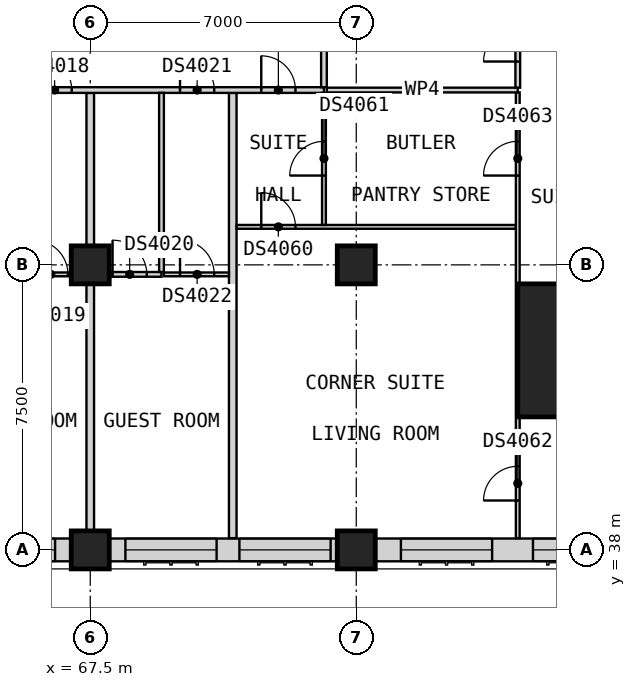
"""IFC4 building model, lengths in metres.
Left out: names, types, materials, properties, quantities, classifications, styles, units other than length and angle.
Written with IfcOpenShell. Run it as: python <this file> out.ifc"""

import sys

from ifc_helpers import new_model, si_unit, direction, frame, frame_2d, origin, origin_2d, place, context, subcontext, project, spatial, rectangle, extrude, element, fill, save


model = new_model("IFC4")
c1 = context("Model", 3, precision=1e-05, world=origin(), true_north=direction((0.0, 1.0)))
c2 = subcontext(c1, "Body", "Model", "MODEL_VIEW")
j1 = project(units=[si_unit("LENGTHUNIT", "METRE"), si_unit("PLANEANGLEUNIT", "RADIAN")], contexts=[c1])
p1 = place(None, origin())
s1 = spatial("IfcSite", under=j1, at=p1, CompositionType="ELEMENT")
p2 = place(p1, origin())
s2 = spatial("IfcBuilding", under=s1, at=p2, CompositionType="ELEMENT")
p3 = place(p2, frame((0.0, 0.0, 141.0)))
s3 = spatial("IfcBuildingStorey", under=s2, at=p3, CompositionType="ELEMENT", Elevation=141.0)
for number, where, z_axis, x_axis in (
    (1, (67.5, 38.0, 0.0), (0.0, 0.0, 1.0), (1.0, 0.0, 0.0)),
    (2, (67.5, 45.5, 0.0), (0.0, 0.0, 1.0), (1.0, 0.0, 0.0)),
    (3, (74.5, 38.0, 0.0), (0.0, 0.0, 1.0), (1.0, 0.0, 0.0)),
    (4, (74.5, 45.5, 0.0), (0.0, 0.0, 1.0), (1.0, 0.0, 0.0)),
):
    element("IfcColumn", number, at=place(p3, frame(where, z_axis=z_axis, x_axis=x_axis)), inside=s3, PredefinedType="COLUMN", context=c2, shape_type="SweptSolid", body=[
        extrude(rectangle(XDim=1.0, YDim=1.0, at=origin_2d()), origin(), (0.0, 0.0, 1.0), 3.6),
    ])
p4 = place(p3, frame((80.5, 43.25, 0.0), z_axis=(0.0, 0.0, 1.0), x_axis=(1.0, 0.0, 0.0)))
e5 = element("IfcColumn", 5, at=p4, inside=s3, PredefinedType="COLUMN", context=c2, shape_type="SweptSolid", body=[
    extrude(rectangle(XDim=3.5, YDim=3.5, at=origin_2d()), origin(), (0.0, 0.0, 1.0), 3.6),
])
p5 = place(p3, frame((60.5, 38.0, 0.0), z_axis=(0.0, 0.0, 1.0), x_axis=(1.0, 0.0, 0.0)))
e6 = element("IfcWall", 6, at=p5, inside=s3, PredefinedType="SOLIDWALL", context=c2, shape_type="SweptSolid", body=[
    extrude(rectangle(XDim=6.5, YDim=0.6, at=frame_2d((3.25, 0.0))), origin(), (0.0, 0.0, 1.0), 2.85),
])
p6 = place(p5, frame((0.425, 0.0, 0.8)))
e7 = element("IfcOpeningElement", 7, at=p6, cuts=e6, PredefinedType="OPENING", context=c2, shape_type="SweptSolid", body=[
    extrude(rectangle(XDim=2.4, YDim=1.8, at=frame_2d((1.2, 0.9))), frame((0.0, 0.31, 0.0), z_axis=(0.0, -1.0, 0.0), x_axis=(1.0, 0.0, 0.0)), (0.0, 0.0, 1.0), 0.62),
])
p7 = place(p5, frame((3.675, 0.0, 0.8)))
e8 = element("IfcOpeningElement", 8, at=p7, cuts=e6, PredefinedType="OPENING", context=c2, shape_type="SweptSolid", body=[
    extrude(rectangle(XDim=2.4, YDim=1.8, at=frame_2d((1.2, 0.9))), frame((0.0, 0.31, 0.0), z_axis=(0.0, -1.0, 0.0), x_axis=(1.0, 0.0, 0.0)), (0.0, 0.0, 1.0), 0.62),
])
p8 = place(p3, frame((68.0, 38.0, 0.0), z_axis=(0.0, 0.0, 1.0), x_axis=(1.0, 0.0, 0.0)))
e9 = element("IfcWall", 9, at=p8, inside=s3, PredefinedType="SOLIDWALL", context=c2, shape_type="SweptSolid", body=[
    extrude(rectangle(XDim=6.0, YDim=0.6, at=frame_2d((3.0, 0.0))), origin(), (0.0, 0.0, 1.0), 2.85),
])
p9 = place(p8, frame((0.425, 0.0, 0.8)))
e10 = element("IfcOpeningElement", 10, at=p9, cuts=e9, PredefinedType="OPENING", context=c2, shape_type="SweptSolid", body=[
    extrude(rectangle(XDim=2.4, YDim=1.8, at=frame_2d((1.2, 0.9))), frame((0.0, 0.31, 0.0), z_axis=(0.0, -1.0, 0.0), x_axis=(1.0, 0.0, 0.0)), (0.0, 0.0, 1.0), 0.62),
])
p10 = place(p8, frame((3.425, 0.0, 0.8)))
e11 = element("IfcOpeningElement", 11, at=p10, cuts=e9, PredefinedType="OPENING", context=c2, shape_type="SweptSolid", body=[
    extrude(rectangle(XDim=2.4, YDim=1.8, at=frame_2d((1.2, 0.9))), frame((0.0, 0.31, 0.0), z_axis=(0.0, -1.0, 0.0), x_axis=(1.0, 0.0, 0.0)), (0.0, 0.0, 1.0), 0.62),
])
p11 = place(p3, frame((75.0, 38.0, 0.0), z_axis=(0.0, 0.0, 1.0), x_axis=(1.0, 0.0, 0.0)))
e12 = element("IfcWall", 12, at=p11, inside=s3, PredefinedType="SOLIDWALL", context=c2, shape_type="SweptSolid", body=[
    extrude(rectangle(XDim=7.25, YDim=0.6, at=frame_2d((3.625, 0.0))), origin(), (0.0, 0.0, 1.0), 2.85),
])
p12 = place(p11, frame((0.675, 0.0, 0.8)))
e13 = element("IfcOpeningElement", 13, at=p12, cuts=e12, PredefinedType="OPENING", context=c2, shape_type="SweptSolid", body=[
    extrude(rectangle(XDim=2.4, YDim=1.8, at=frame_2d((1.2, 0.9))), frame((0.0, 0.31, 0.0), z_axis=(0.0, -1.0, 0.0), x_axis=(1.0, 0.0, 0.0)), (0.0, 0.0, 1.0), 0.62),
])
p13 = place(p11, frame((4.15, 0.0, 0.8)))
e14 = element("IfcOpeningElement", 14, at=p13, cuts=e12, PredefinedType="OPENING", context=c2, shape_type="SweptSolid", body=[
    extrude(rectangle(XDim=1.8, YDim=1.8, at=frame_2d((0.9, 0.9))), frame((0.0, 0.31, 0.0), z_axis=(0.0, -1.0, 0.0), x_axis=(1.0, 0.0, 0.0)), (0.0, 0.0, 1.0), 0.62),
])
p14 = place(p3, frame((67.5, 37.5, 0.0), z_axis=(0.0, 0.0, 1.0), x_axis=(0.0, 1.0, 0.0)))
e15 = element("IfcWall", 15, at=p14, inside=s3, PredefinedType="PARTITIONING", context=c2, shape_type="SweptSolid", body=[
    extrude(rectangle(XDim=12.525, YDim=0.2, at=frame_2d((6.262, 0.0))), origin(), (0.0, 0.0, 1.0), 3.35),
])
p15 = place(p3, frame((71.25, 38.31, 0.0), z_axis=(0.0, 0.0, 1.0), x_axis=(0.0, 1.0, 0.0)))
e16 = element("IfcWall", 16, at=p15, inside=s3, PredefinedType="PARTITIONING", context=c2, shape_type="SweptSolid", body=[
    extrude(rectangle(XDim=11.715, YDim=0.2, at=frame_2d((5.857, 0.0))), origin(), (0.0, 0.0, 1.0), 3.35),
])
p16 = place(p3, frame((33.75, 50.1, 0.0), z_axis=(0.0, 0.0, 1.0), x_axis=(1.0, 0.0, 0.0)))
e17 = element("IfcWall", 17, at=p16, inside=s3, PredefinedType="PARTITIONING", context=c2, shape_type="SweptSolid", body=[
    extrude(rectangle(XDim=39.9, YDim=0.15, at=frame_2d((19.95, 0.0))), origin(), (0.0, 0.0, 1.0), 3.35),
])
p17 = place(p16, frame((5.175, 0.0, 0.0)))
e18 = element("IfcOpeningElement", 18, at=p17, cuts=e17, PredefinedType="OPENING", context=c2, shape_type="SweptSolid", body=[
    extrude(rectangle(XDim=0.9, YDim=2.1, at=frame_2d((0.45, 1.05))), frame((0.0, 0.085, 0.0), z_axis=(0.0, -1.0, 0.0), x_axis=(1.0, 0.0, 0.0)), (0.0, 0.0, 1.0), 0.17),
])
p18 = place(p16, frame((9.863, 0.0, 0.0)))
e19 = element("IfcOpeningElement", 19, at=p18, cuts=e17, PredefinedType="OPENING", context=c2, shape_type="SweptSolid", body=[
    extrude(rectangle(XDim=0.9, YDim=2.1, at=frame_2d((0.45, 1.05))), frame((0.0, 0.085, 0.0), z_axis=(0.0, -1.0, 0.0), x_axis=(1.0, 0.0, 0.0)), (0.0, 0.0, 1.0), 0.17),
])
p19 = place(p16, frame((13.613, 0.0, 0.0)))
e20 = element("IfcOpeningElement", 20, at=p19, cuts=e17, PredefinedType="OPENING", context=c2, shape_type="SweptSolid", body=[
    extrude(rectangle(XDim=0.9, YDim=2.1, at=frame_2d((0.45, 1.05))), frame((0.0, 0.085, 0.0), z_axis=(0.0, -1.0, 0.0), x_axis=(1.0, 0.0, 0.0)), (0.0, 0.0, 1.0), 0.17),
])
p20 = place(p16, frame((20.688, 0.0, 0.0)))
e21 = element("IfcOpeningElement", 21, at=p20, cuts=e17, PredefinedType="OPENING", context=c2, shape_type="SweptSolid", body=[
    extrude(rectangle(XDim=1.0, YDim=2.1, at=frame_2d((0.5, 1.05))), frame((0.0, 0.085, 0.0), z_axis=(0.0, -1.0, 0.0), x_axis=(1.0, 0.0, 0.0)), (0.0, 0.0, 1.0), 0.17),
])
p21 = place(p16, frame((28.188, 0.0, 0.0)))
e22 = element("IfcOpeningElement", 22, at=p21, cuts=e17, PredefinedType="OPENING", context=c2, shape_type="SweptSolid", body=[
    extrude(rectangle(XDim=1.0, YDim=2.1, at=frame_2d((0.5, 1.05))), frame((0.0, 0.085, 0.0), z_axis=(0.0, -1.0, 0.0), x_axis=(1.0, 0.0, 0.0)), (0.0, 0.0, 1.0), 0.17),
])
p22 = place(p16, frame((32.363, 0.0, 0.0)))
e23 = element("IfcOpeningElement", 23, at=p22, cuts=e17, PredefinedType="OPENING", context=c2, shape_type="SweptSolid", body=[
    extrude(rectangle(XDim=0.9, YDim=2.1, at=frame_2d((0.45, 1.05))), frame((0.0, 0.085, 0.0), z_axis=(0.0, -1.0, 0.0), x_axis=(1.0, 0.0, 0.0)), (0.0, 0.0, 1.0), 0.17),
])
p23 = place(p16, frame((36.113, 0.0, 0.0)))
e24 = element("IfcOpeningElement", 24, at=p23, cuts=e17, PredefinedType="OPENING", context=c2, shape_type="SweptSolid", body=[
    extrude(rectangle(XDim=0.9, YDim=2.1, at=frame_2d((0.45, 1.05))), frame((0.0, 0.085, 0.0), z_axis=(0.0, -1.0, 0.0), x_axis=(1.0, 0.0, 0.0)), (0.0, 0.0, 1.0), 0.17),
])
p24 = place(p16, frame((38.25, 0.0, 0.0)))
e25 = element("IfcOpeningElement", 25, at=p24, cuts=e17, PredefinedType="OPENING", context=c2, shape_type="SweptSolid", body=[
    extrude(rectangle(XDim=0.9, YDim=2.1, at=frame_2d((0.45, 1.05))), frame((0.0, 0.085, 0.0), z_axis=(0.0, -1.0, 0.0), x_axis=(1.0, 0.0, 0.0)), (0.0, 0.0, 1.0), 0.17),
])
p25 = place(p3, frame((73.65, 50.175, 0.0), z_axis=(0.0, 0.0, 1.0), x_axis=(0.0, 1.0, 0.0)))
e26 = element("IfcWall", 26, at=p25, inside=s3, PredefinedType="PARTITIONING", context=c2, shape_type="SweptSolid", body=[
    extrude(rectangle(XDim=38.4, YDim=0.15, at=frame_2d((19.2, 0.0))), origin(), (0.0, 0.0, 1.0), 3.35),
])
p26 = place(p25, frame((7.875, 0.0, 0.0)))
e27 = element("IfcOpeningElement", 27, at=p26, cuts=e26, PredefinedType="OPENING", context=c2, shape_type="SweptSolid", body=[
    extrude(rectangle(XDim=0.9, YDim=2.1, at=frame_2d((0.45, 1.05))), frame((0.0, 0.085, 0.0), z_axis=(0.0, -1.0, 0.0), x_axis=(1.0, 0.0, 0.0)), (0.0, 0.0, 1.0), 0.17),
])
p27 = place(p25, frame((23.012, 0.0, 0.0)))
e28 = element("IfcOpeningElement", 28, at=p27, cuts=e26, PredefinedType="OPENING", context=c2, shape_type="SweptSolid", body=[
    extrude(rectangle(XDim=1.0, YDim=2.1, at=frame_2d((0.5, 1.05))), frame((0.0, 0.085, 0.0), z_axis=(0.0, -1.0, 0.0), x_axis=(1.0, 0.0, 0.0)), (0.0, 0.0, 1.0), 0.17),
])
p28 = place(p25, frame((27.188, 0.0, 0.0)))
e29 = element("IfcOpeningElement", 29, at=p28, cuts=e26, PredefinedType="OPENING", context=c2, shape_type="SweptSolid", body=[
    extrude(rectangle(XDim=0.9, YDim=2.1, at=frame_2d((0.45, 1.05))), frame((0.0, 0.085, 0.0), z_axis=(0.0, -1.0, 0.0), x_axis=(1.0, 0.0, 0.0)), (0.0, 0.0, 1.0), 0.17),
])
p29 = place(p25, frame((34.125, 0.0, 0.0)))
e30 = element("IfcOpeningElement", 30, at=p29, cuts=e26, PredefinedType="OPENING", context=c2, shape_type="SweptSolid", body=[
    extrude(rectangle(XDim=0.9, YDim=2.1, at=frame_2d((0.45, 1.05))), frame((0.0, 0.085, 0.0), z_axis=(0.0, -1.0, 0.0), x_axis=(1.0, 0.0, 0.0)), (0.0, 0.0, 1.0), 0.17),
])
p30 = place(p3, frame((78.8, 42.0, 0.0), z_axis=(0.0, 0.0, 1.0), x_axis=(1.0, 0.0, 0.0)))
e31 = element("IfcWall", 31, at=p30, inside=s3, PredefinedType="PARTITIONING", context=c2, shape_type="SweptSolid", body=[
    extrude(rectangle(XDim=3.44, YDim=0.1, at=frame_2d((1.72, 0.0))), origin(), (0.0, 0.0, 1.0), 3.35),
])
p31 = place(p3, frame((65.688, 45.25, 0.0), z_axis=(0.0, 0.0, 1.0), x_axis=(1.0, 0.0, 0.0)))
e32 = element("IfcWall", 32, at=p31, inside=s3, PredefinedType="PARTITIONING", context=c2, shape_type="SweptSolid", body=[
    extrude(rectangle(XDim=1.712, YDim=0.1, at=frame_2d((0.856, 0.0))), origin(), (0.0, 0.0, 1.0), 3.35),
])
p32 = place(p31, frame((0.325, 0.0, 0.0)))
e33 = element("IfcOpeningElement", 33, at=p32, cuts=e32, PredefinedType="OPENING", context=c2, shape_type="SweptSolid", body=[
    extrude(rectangle(XDim=0.9, YDim=2.1, at=frame_2d((0.45, 1.05))), frame((0.0, 0.06, 0.0), z_axis=(0.0, -1.0, 0.0), x_axis=(1.0, 0.0, 0.0)), (0.0, 0.0, 1.0), 0.12),
])
p33 = place(p3, frame((69.438, 45.25, 0.0), z_axis=(0.0, 0.0, 1.0), x_axis=(1.0, 0.0, 0.0)))
e34 = element("IfcWall", 34, at=p33, inside=s3, PredefinedType="PARTITIONING", context=c2, shape_type="SweptSolid", body=[
    extrude(rectangle(XDim=1.712, YDim=0.1, at=frame_2d((0.856, 0.0))), origin(), (0.0, 0.0, 1.0), 3.35),
])
p34 = place(p33, frame((0.425, 0.0, 0.0)))
e35 = element("IfcOpeningElement", 35, at=p34, cuts=e34, PredefinedType="OPENING", context=c2, shape_type="SweptSolid", body=[
    extrude(rectangle(XDim=0.9, YDim=2.1, at=frame_2d((0.45, 1.05))), frame((0.0, 0.06, 0.0), z_axis=(0.0, -1.0, 0.0), x_axis=(1.0, 0.0, 0.0)), (0.0, 0.0, 1.0), 0.12),
])
p35 = place(p3, frame((71.35, 46.5, 0.0), z_axis=(0.0, 0.0, 1.0), x_axis=(1.0, 0.0, 0.0)))
e36 = element("IfcWall", 36, at=p35, inside=s3, PredefinedType="PARTITIONING", context=c2, shape_type="SweptSolid", body=[
    extrude(rectangle(XDim=7.35, YDim=0.1, at=frame_2d((3.675, 0.0))), origin(), (0.0, 0.0, 1.0), 3.35),
])
p36 = place(p35, frame((0.65, 0.0, 0.0)))
e37 = element("IfcOpeningElement", 37, at=p36, cuts=e36, PredefinedType="OPENING", context=c2, shape_type="SweptSolid", body=[
    extrude(rectangle(XDim=0.9, YDim=2.1, at=frame_2d((0.45, 1.05))), frame((0.0, 0.06, 0.0), z_axis=(0.0, -1.0, 0.0), x_axis=(1.0, 0.0, 0.0)), (0.0, 0.0, 1.0), 0.12),
])
p37 = place(p3, frame((73.65, 46.55, 0.0), z_axis=(0.0, 0.0, 1.0), x_axis=(0.0, 1.0, 0.0)))
e38 = element("IfcWall", 38, at=p37, inside=s3, PredefinedType="PARTITIONING", context=c2, shape_type="SweptSolid", body=[
    extrude(rectangle(XDim=3.475, YDim=0.1, at=frame_2d((1.737, 0.0))), origin(), (0.0, 0.0, 1.0), 3.35),
])
p38 = place(p37, frame((1.3, 0.0, 0.0)))
e39 = element("IfcOpeningElement", 39, at=p38, cuts=e38, PredefinedType="OPENING", context=c2, shape_type="SweptSolid", body=[
    extrude(rectangle(XDim=0.9, YDim=2.1, at=frame_2d((0.45, 1.05))), frame((0.0, 0.06, 0.0), z_axis=(0.0, -1.0, 0.0), x_axis=(1.0, 0.0, 0.0)), (0.0, 0.0, 1.0), 0.12),
])
p39 = place(p3, frame((78.75, 38.31, 0.0), z_axis=(0.0, 0.0, 1.0), x_axis=(0.0, 1.0, 0.0)))
e40 = element("IfcWall", 40, at=p39, inside=s3, PredefinedType="PARTITIONING", context=c2, shape_type="SweptSolid", body=[
    extrude(rectangle(XDim=11.728, YDim=0.1, at=frame_2d((5.864, 0.0))), origin(), (0.0, 0.0, 1.0), 3.35),
])
p40 = place(p39, frame((0.99, 0.0, 0.0)))
e41 = element("IfcOpeningElement", 41, at=p40, cuts=e40, PredefinedType="OPENING", context=c2, shape_type="SweptSolid", body=[
    extrude(rectangle(XDim=0.9, YDim=2.1, at=frame_2d((0.45, 1.05))), frame((0.0, 0.06, 0.0), z_axis=(0.0, -1.0, 0.0), x_axis=(1.0, 0.0, 0.0)), (0.0, 0.0, 1.0), 0.12),
])
p41 = place(p39, frame((9.54, 0.0, 0.0)))
e42 = element("IfcOpeningElement", 42, at=p41, cuts=e40, PredefinedType="OPENING", context=c2, shape_type="SweptSolid", body=[
    extrude(rectangle(XDim=0.9, YDim=2.1, at=frame_2d((0.45, 1.05))), frame((0.0, 0.06, 0.0), z_axis=(0.0, -1.0, 0.0), x_axis=(1.0, 0.0, 0.0)), (0.0, 0.0, 1.0), 0.12),
])
p42 = place(p3, frame((67.6, 45.25, 0.0), z_axis=(0.0, 0.0, 1.0), x_axis=(1.0, 0.0, 0.0)))
e43 = element("IfcWall", 43, at=p42, inside=s3, PredefinedType="PARTITIONING", context=c2, shape_type="SweptSolid", body=[
    extrude(rectangle(XDim=1.775, YDim=0.125, at=frame_2d((0.887, 0.0))), origin(), (0.0, 0.0, 1.0), 3.35),
])
p43 = place(p42, frame((0.488, 0.0, 0.0)))
e44 = element("IfcOpeningElement", 44, at=p43, cuts=e43, PredefinedType="OPENING", context=c2, shape_type="SweptSolid", body=[
    extrude(rectangle(XDim=0.9, YDim=2.1, at=frame_2d((0.45, 1.05))), frame((0.0, 0.073, 0.0), z_axis=(0.0, -1.0, 0.0), x_axis=(1.0, 0.0, 0.0)), (0.0, 0.0, 1.0), 0.145),
])
p44 = place(p3, frame((73.725, 50.1, 0.0), z_axis=(0.0, 0.0, 1.0), x_axis=(1.0, 0.0, 0.0)))
e45 = element("IfcWall", 45, at=p44, inside=s3, PredefinedType="PARTITIONING", context=c2, shape_type="SweptSolid", body=[
    extrude(rectangle(XDim=5.025, YDim=0.125, at=frame_2d((2.512, 0.0))), origin(), (0.0, 0.0, 1.0), 3.35),
])
p45 = place(p3, frame((69.375, 45.312, 0.0), z_axis=(0.0, 0.0, 1.0), x_axis=(0.0, 1.0, 0.0)))
e46 = element("IfcWall", 46, at=p45, inside=s3, PredefinedType="PARTITIONING", context=c2, shape_type="SweptSolid", body=[
    extrude(rectangle(XDim=4.712, YDim=0.125, at=frame_2d((2.356, 0.0))), origin(), (0.0, 0.0, 1.0), 3.35),
])
p46 = place(p3, frame((78.75, 50.163, 0.0), z_axis=(0.0, 0.0, 1.0), x_axis=(0.0, 1.0, 0.0)))
e47 = element("IfcWall", 47, at=p46, inside=s3, PredefinedType="PARTITIONING", context=c2, shape_type="SweptSolid", body=[
    extrude(rectangle(XDim=2.237, YDim=0.125, at=frame_2d((1.119, 0.0))), origin(), (0.0, 0.0, 1.0), 3.35),
])
p47 = place(p46, frame((0.688, 0.0, 0.0)))
e48 = element("IfcOpeningElement", 48, at=p47, cuts=e47, PredefinedType="OPENING", context=c2, shape_type="SweptSolid", body=[
    extrude(rectangle(XDim=0.9, YDim=2.1, at=frame_2d((0.45, 1.05))), frame((0.0, 0.073, 0.0), z_axis=(0.0, -1.0, 0.0), x_axis=(1.0, 0.0, 0.0)), (0.0, 0.0, 1.0), 0.145),
])
p48 = place(p7, origin())
e49 = element("IfcWindow", 49, at=p48, inside=s3, PartitioningType="SINGLE_PANEL", PredefinedType="WINDOW", context=c2, shape_type="SweptSolid", body=[
    extrude(rectangle(XDim=2.4, YDim=1.8, at=frame_2d((1.2, 0.9))), frame((0.0, -0.07, 0.0), z_axis=(0.0, -1.0, 0.0), x_axis=(1.0, 0.0, 0.0)), (0.0, 0.0, 1.0), 0.06),
])
fill(e8, e49)
p49 = place(p9, origin())
e50 = element("IfcWindow", 50, at=p49, inside=s3, PartitioningType="SINGLE_PANEL", PredefinedType="WINDOW", context=c2, shape_type="SweptSolid", body=[
    extrude(rectangle(XDim=2.4, YDim=1.8, at=frame_2d((1.2, 0.9))), frame((0.0, -0.07, 0.0), z_axis=(0.0, -1.0, 0.0), x_axis=(1.0, 0.0, 0.0)), (0.0, 0.0, 1.0), 0.06),
])
fill(e10, e50)
p50 = place(p10, origin())
e51 = element("IfcWindow", 51, at=p50, inside=s3, PartitioningType="SINGLE_PANEL", PredefinedType="WINDOW", context=c2, shape_type="SweptSolid", body=[
    extrude(rectangle(XDim=2.4, YDim=1.8, at=frame_2d((1.2, 0.9))), frame((0.0, -0.07, 0.0), z_axis=(0.0, -1.0, 0.0), x_axis=(1.0, 0.0, 0.0)), (0.0, 0.0, 1.0), 0.06),
])
fill(e11, e51)
p51 = place(p12, origin())
e52 = element("IfcWindow", 52, at=p51, inside=s3, PartitioningType="SINGLE_PANEL", PredefinedType="WINDOW", context=c2, shape_type="SweptSolid", body=[
    extrude(rectangle(XDim=2.4, YDim=1.8, at=frame_2d((1.2, 0.9))), frame((0.0, -0.07, 0.0), z_axis=(0.0, -1.0, 0.0), x_axis=(1.0, 0.0, 0.0)), (0.0, 0.0, 1.0), 0.06),
])
fill(e13, e52)
p52 = place(p13, origin())
e53 = element("IfcWindow", 53, at=p52, inside=s3, PartitioningType="SINGLE_PANEL", PredefinedType="WINDOW", context=c2, shape_type="SweptSolid", body=[
    extrude(rectangle(XDim=1.8, YDim=1.8, at=frame_2d((0.9, 0.9))), frame((0.0, -0.07, 0.0), z_axis=(0.0, -1.0, 0.0), x_axis=(1.0, 0.0, 0.0)), (0.0, 0.0, 1.0), 0.06),
])
fill(e14, e53)
p53 = place(p22, origin())
e54 = element("IfcDoor", 54, at=p53, inside=s3, OperationType="SINGLE_SWING_RIGHT", PredefinedType="DOOR", context=c2, shape_type="SweptSolid", body=[
    extrude(rectangle(XDim=0.9, YDim=2.1, at=frame_2d((0.45, 1.05))), frame((0.0, 0.025, 0.0), z_axis=(0.0, -1.0, 0.0), x_axis=(1.0, 0.0, 0.0)), (0.0, 0.0, 1.0), 0.05),
])
fill(e23, e54)
p54 = place(p32, origin())
e55 = element("IfcDoor", 55, at=p54, inside=s3, OperationType="SINGLE_SWING_LEFT", PredefinedType="DOOR", context=c2, shape_type="SweptSolid", body=[
    extrude(rectangle(XDim=0.9, YDim=2.1, at=frame_2d((0.45, 1.05))), frame((0.0, 0.025, 0.0), z_axis=(0.0, -1.0, 0.0), x_axis=(1.0, 0.0, 0.0)), (0.0, 0.0, 1.0), 0.05),
])
fill(e33, e55)
p55 = place(p43, origin())
e56 = element("IfcDoor", 56, at=p55, inside=s3, OperationType="SINGLE_SWING_RIGHT", PredefinedType="DOOR", context=c2, shape_type="SweptSolid", body=[
    extrude(rectangle(XDim=0.9, YDim=2.1, at=frame_2d((0.45, 1.05))), frame((0.0, 0.025, 0.0), z_axis=(0.0, -1.0, 0.0), x_axis=(1.0, 0.0, 0.0)), (0.0, 0.0, 1.0), 0.05),
])
fill(e44, e56)
p56 = place(p23, origin())
e57 = element("IfcDoor", 57, at=p56, inside=s3, OperationType="SINGLE_SWING_RIGHT", PredefinedType="DOOR", context=c2, shape_type="SweptSolid", body=[
    extrude(rectangle(XDim=0.9, YDim=2.1, at=frame_2d((0.45, 1.05))), frame((0.0, 0.025, 0.0), z_axis=(0.0, -1.0, 0.0), x_axis=(1.0, 0.0, 0.0)), (0.0, 0.0, 1.0), 0.05),
])
fill(e24, e57)
p57 = place(p34, origin())
e58 = element("IfcDoor", 58, at=p57, inside=s3, OperationType="SINGLE_SWING_LEFT", PredefinedType="DOOR", context=c2, shape_type="SweptSolid", body=[
    extrude(rectangle(XDim=0.9, YDim=2.1, at=frame_2d((0.45, 1.05))), frame((0.0, 0.025, 0.0), z_axis=(0.0, -1.0, 0.0), x_axis=(1.0, 0.0, 0.0)), (0.0, 0.0, 1.0), 0.05),
])
fill(e35, e58)
p58 = place(p24, origin())
e59 = element("IfcDoor", 59, at=p58, inside=s3, OperationType="SINGLE_SWING_LEFT", PredefinedType="DOOR", context=c2, shape_type="SweptSolid", body=[
    extrude(rectangle(XDim=0.9, YDim=2.1, at=frame_2d((0.45, 1.05))), frame((0.0, 0.025, 0.0), z_axis=(0.0, -1.0, 0.0), x_axis=(1.0, 0.0, 0.0)), (0.0, 0.0, 1.0), 0.05),
])
fill(e25, e59)
p59 = place(p36, origin())
e60 = element("IfcDoor", 60, at=p59, inside=s3, OperationType="SINGLE_SWING_RIGHT", PredefinedType="DOOR", context=c2, shape_type="SweptSolid", body=[
    extrude(rectangle(XDim=0.9, YDim=2.1, at=frame_2d((0.45, 1.05))), frame((0.0, 0.025, 0.0), z_axis=(0.0, -1.0, 0.0), x_axis=(1.0, 0.0, 0.0)), (0.0, 0.0, 1.0), 0.05),
])
fill(e37, e60)
p60 = place(p38, origin())
e61 = element("IfcDoor", 61, at=p60, inside=s3, OperationType="SINGLE_SWING_RIGHT", PredefinedType="DOOR", context=c2, shape_type="SweptSolid", body=[
    extrude(rectangle(XDim=0.9, YDim=2.1, at=frame_2d((0.45, 1.05))), frame((0.0, 0.025, 0.0), z_axis=(0.0, -1.0, 0.0), x_axis=(1.0, 0.0, 0.0)), (0.0, 0.0, 1.0), 0.05),
])
fill(e39, e61)
p61 = place(p40, origin())
e62 = element("IfcDoor", 62, at=p61, inside=s3, OperationType="SINGLE_SWING_LEFT", PredefinedType="DOOR", context=c2, shape_type="SweptSolid", body=[
    extrude(rectangle(XDim=0.9, YDim=2.1, at=frame_2d((0.45, 1.05))), frame((0.0, 0.025, 0.0), z_axis=(0.0, -1.0, 0.0), x_axis=(1.0, 0.0, 0.0)), (0.0, 0.0, 1.0), 0.05),
])
fill(e41, e62)
p62 = place(p41, origin())
e63 = element("IfcDoor", 63, at=p62, inside=s3, OperationType="SINGLE_SWING_RIGHT", PredefinedType="DOOR", context=c2, shape_type="SweptSolid", body=[
    extrude(rectangle(XDim=0.9, YDim=2.1, at=frame_2d((0.45, 1.05))), frame((0.0, 0.025, 0.0), z_axis=(0.0, -1.0, 0.0), x_axis=(1.0, 0.0, 0.0)), (0.0, 0.0, 1.0), 0.05),
])
fill(e42, e63)
p63 = place(p47, origin())
e64 = element("IfcDoor", 64, at=p63, inside=s3, OperationType="SINGLE_SWING_LEFT", PredefinedType="DOOR", context=c2, shape_type="SweptSolid", body=[
    extrude(rectangle(XDim=0.9, YDim=2.1, at=frame_2d((0.45, 1.05))), frame((0.0, 0.025, 0.0), z_axis=(0.0, -1.0, 0.0), x_axis=(1.0, 0.0, 0.0)), (0.0, 0.0, 1.0), 0.05),
])
fill(e48, e64)
save(model, sys.argv[1])
